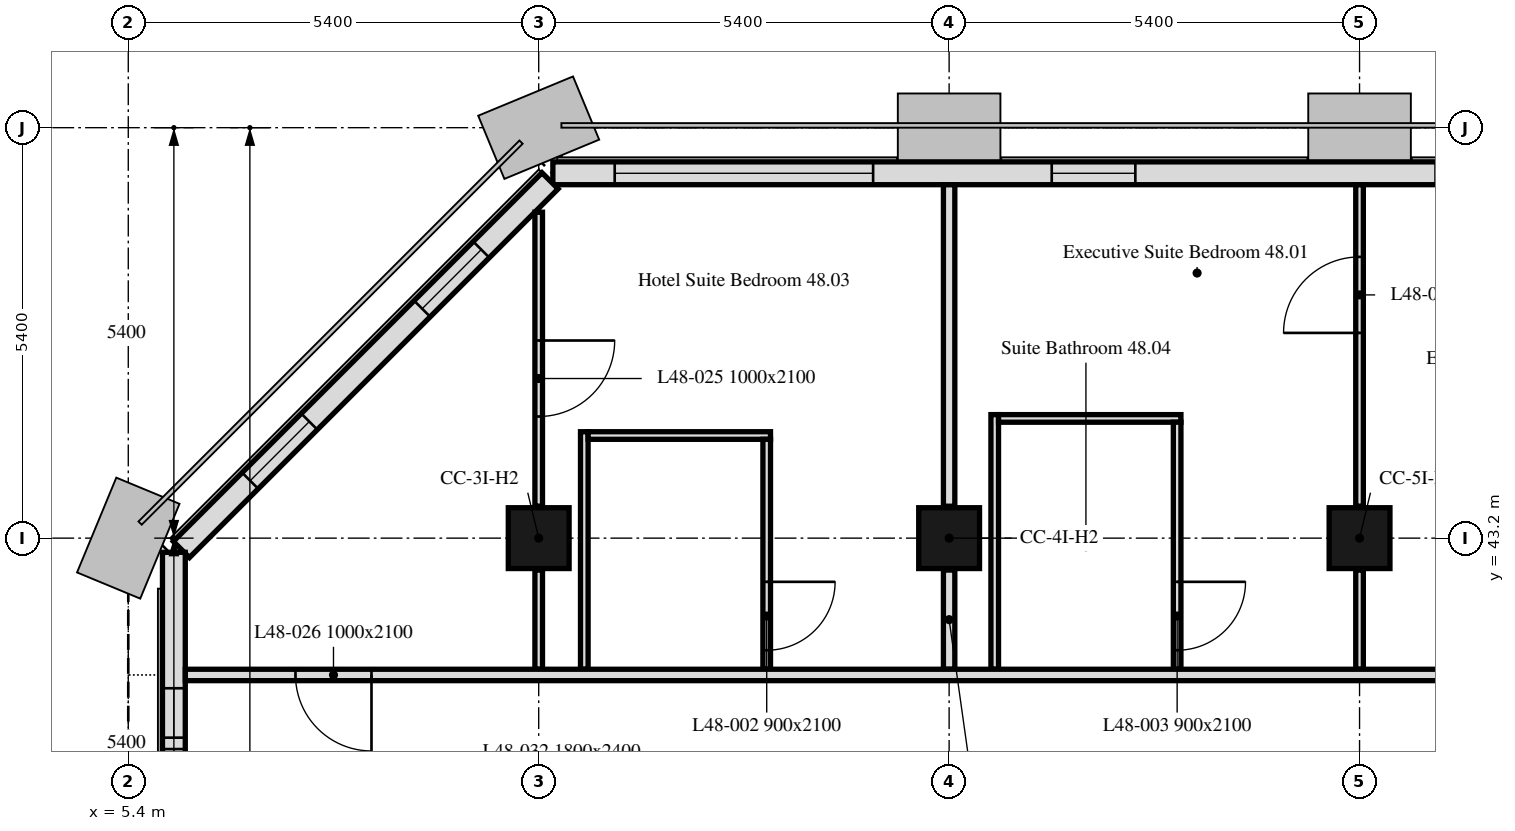
"""IFC4 building model, lengths in metres.
Left out: names, types, materials, properties, quantities, classifications, styles, units other than length and angle.
Written with IfcOpenShell. Run it as: python <this file> out.ifc"""

import sys

from ifc_helpers import new_model, si_unit, direction, frame, frame_2d, origin, origin_2d, place, context, subcontext, project, spatial, rectangle, extrude, element, fill, save


model = new_model("IFC4")
c1 = context("Model", 3, precision=1e-05, world=origin(), true_north=direction((0.0, 1.0)))
c2 = subcontext(c1, "Body", "Model", "MODEL_VIEW")
j1 = project(units=[si_unit("LENGTHUNIT", "METRE"), si_unit("PLANEANGLEUNIT", "RADIAN")], contexts=[c1])
p1 = place(None, origin())
s1 = spatial("IfcSite", under=j1, at=p1, CompositionType="ELEMENT")
p2 = place(p1, origin())
s2 = spatial("IfcBuilding", under=s1, at=p2, CompositionType="ELEMENT")
p3 = place(p2, frame((0.0, 0.0, 197.2)))
s3 = spatial("IfcBuildingStorey", under=s2, at=p3, CompositionType="ELEMENT", Elevation=197.2)
for number, where, z_axis, x_axis in (
    (1, (10.8, 43.2, 0.0), (0.0, 0.0, 1.0), (1.0, 0.0, 0.0)),
    (2, (16.2, 43.2, 0.0), (0.0, 0.0, 1.0), (1.0, 0.0, 0.0)),
    (3, (21.6, 43.2, 0.0), (0.0, 0.0, 1.0), (1.0, 0.0, 0.0)),
):
    element("IfcColumn", number, at=place(p3, frame(where, z_axis=z_axis, x_axis=x_axis)), inside=s3, PredefinedType="COLUMN", context=c2, shape_type="SweptSolid", body=[
        extrude(rectangle(XDim=0.8, YDim=0.8, at=origin_2d()), origin(), (0.0, 0.0, 1.0), 3.0),
    ])
p4 = place(p3, frame((43.014, 48.0, 0.0), z_axis=(0.0, 0.0, 1.0), x_axis=(-1.0, 0.0, 0.0)))
e4 = element("IfcWall", 4, at=p4, inside=s3, PredefinedType="SOLIDWALL", context=c2, shape_type="SweptSolid", body=[
    extrude(rectangle(XDim=32.027, YDim=0.3, at=frame_2d((16.014, 0.0))), origin(), (0.0, 0.0, 1.0), 3.0),
])
p5 = place(p4, frame((2.764, 0.0, 0.9)))
e5 = element("IfcOpeningElement", 5, at=p5, cuts=e4, PredefinedType="OPENING", context=c2, shape_type="SweptSolid", body=[
    extrude(rectangle(XDim=1.1, YDim=1.7, at=frame_2d((0.55, 0.85))), frame((0.0, 0.16, 0.0), z_axis=(0.0, -1.0, 0.0), x_axis=(1.0, 0.0, 0.0)), (0.0, 0.0, 1.0), 0.32),
])
p6 = place(p4, frame((6.214, 0.0, 0.9)))
e6 = element("IfcOpeningElement", 6, at=p6, cuts=e4, PredefinedType="OPENING", context=c2, shape_type="SweptSolid", body=[
    extrude(rectangle(XDim=3.4, YDim=1.7, at=frame_2d((1.7, 0.85))), frame((0.0, 0.16, 0.0), z_axis=(0.0, -1.0, 0.0), x_axis=(1.0, 0.0, 0.0)), (0.0, 0.0, 1.0), 0.32),
])
p7 = place(p4, frame((13.564, 0.0, 0.9)))
e7 = element("IfcOpeningElement", 7, at=p7, cuts=e4, PredefinedType="OPENING", context=c2, shape_type="SweptSolid", body=[
    extrude(rectangle(XDim=1.1, YDim=1.7, at=frame_2d((0.55, 0.85))), frame((0.0, 0.16, 0.0), z_axis=(0.0, -1.0, 0.0), x_axis=(1.0, 0.0, 0.0)), (0.0, 0.0, 1.0), 0.32),
])
p8 = place(p4, frame((17.014, 0.0, 0.9)))
e8 = element("IfcOpeningElement", 8, at=p8, cuts=e4, PredefinedType="OPENING", context=c2, shape_type="SweptSolid", body=[
    extrude(rectangle(XDim=3.4, YDim=1.7, at=frame_2d((1.7, 0.85))), frame((0.0, 0.16, 0.0), z_axis=(0.0, -1.0, 0.0), x_axis=(1.0, 0.0, 0.0)), (0.0, 0.0, 1.0), 0.32),
])
p9 = place(p4, frame((24.364, 0.0, 0.9)))
e9 = element("IfcOpeningElement", 9, at=p9, cuts=e4, PredefinedType="OPENING", context=c2, shape_type="SweptSolid", body=[
    extrude(rectangle(XDim=1.1, YDim=1.7, at=frame_2d((0.55, 0.85))), frame((0.0, 0.16, 0.0), z_axis=(0.0, -1.0, 0.0), x_axis=(1.0, 0.0, 0.0)), (0.0, 0.0, 1.0), 0.32),
])
p10 = place(p4, frame((27.814, 0.0, 0.9)))
e10 = element("IfcOpeningElement", 10, at=p10, cuts=e4, PredefinedType="OPENING", context=c2, shape_type="SweptSolid", body=[
    extrude(rectangle(XDim=3.4, YDim=1.7, at=frame_2d((1.7, 0.85))), frame((0.0, 0.16, 0.0), z_axis=(0.0, -1.0, 0.0), x_axis=(1.0, 0.0, 0.0)), (0.0, 0.0, 1.0), 0.32),
])
p11 = place(p3, frame((10.949, 47.901, 0.0), z_axis=(0.0, 0.0, 1.0), x_axis=(-0.707106781187, -0.707106781187, 0.0)))
e11 = element("IfcWall", 11, at=p11, inside=s3, PredefinedType="SOLIDWALL", context=c2, shape_type="SweptSolid", body=[
    extrude(rectangle(XDim=6.86, YDim=0.3, at=frame_2d((3.43, 0.0))), origin(), (0.0, 0.0, 1.0), 3.0),
])
p12 = place(p11, frame((1.28, 0.0, 0.9)))
e12 = element("IfcOpeningElement", 12, at=p12, cuts=e11, PredefinedType="OPENING", context=c2, shape_type="SweptSolid", body=[
    extrude(rectangle(XDim=1.1, YDim=1.7, at=frame_2d((0.55, 0.85))), frame((0.0, 0.16, 0.0), z_axis=(0.0, -1.0, 0.0), x_axis=(1.0, 0.0, 0.0)), (0.0, 0.0, 1.0), 0.32),
])
p13 = place(p11, frame((4.48, 0.0, 0.9)))
e13 = element("IfcOpeningElement", 13, at=p13, cuts=e11, PredefinedType="OPENING", context=c2, shape_type="SweptSolid", body=[
    extrude(rectangle(XDim=1.1, YDim=1.7, at=frame_2d((0.55, 0.85))), frame((0.0, 0.16, 0.0), z_axis=(0.0, -1.0, 0.0), x_axis=(1.0, 0.0, 0.0)), (0.0, 0.0, 1.0), 0.32),
])
p14 = place(p3, frame((6.0, 43.014, 0.0), z_axis=(0.0, 0.0, 1.0), x_axis=(0.0, -1.0, 0.0)))
e14 = element("IfcWall", 14, at=p14, inside=s3, PredefinedType="SOLIDWALL", context=c2, shape_type="SweptSolid", body=[
    extrude(rectangle(XDim=10.614, YDim=0.3, at=frame_2d((5.307, 0.0))), origin(), (0.0, 0.0, 1.0), 3.0),
])
p15 = place(p14, frame((1.789, 0.0, 0.9)))
e15 = element("IfcOpeningElement", 15, at=p15, cuts=e14, PredefinedType="OPENING", context=c2, shape_type="SweptSolid", body=[
    extrude(rectangle(XDim=0.65, YDim=1.7, at=frame_2d((0.325, 0.85))), frame((0.0, 0.16, 0.0), z_axis=(0.0, -1.0, 0.0), x_axis=(1.0, 0.0, 0.0)), (0.0, 0.0, 1.0), 0.32),
])
p16 = place(p14, frame((2.589, 0.0, 0.9)))
e16 = element("IfcOpeningElement", 16, at=p16, cuts=e14, PredefinedType="OPENING", context=c2, shape_type="SweptSolid", body=[
    extrude(rectangle(XDim=0.65, YDim=1.7, at=frame_2d((0.325, 0.85))), frame((0.0, 0.16, 0.0), z_axis=(0.0, -1.0, 0.0), x_axis=(1.0, 0.0, 0.0)), (0.0, 0.0, 1.0), 0.32),
])
p17 = place(p14, frame((6.214, 0.0, 0.9)))
e17 = element("IfcOpeningElement", 17, at=p17, cuts=e14, PredefinedType="OPENING", context=c2, shape_type="SweptSolid", body=[
    extrude(rectangle(XDim=3.4, YDim=1.7, at=frame_2d((1.7, 0.85))), frame((0.0, 0.16, 0.0), z_axis=(0.0, -1.0, 0.0), x_axis=(1.0, 0.0, 0.0)), (0.0, 0.0, 1.0), 0.32),
])
p18 = place(p3, frame((10.8, 47.488, 0.0), z_axis=(0.0, 0.0, 1.0), x_axis=(0.0, -1.0, 0.0)))
e18 = element("IfcWall", 18, at=p18, inside=s3, PredefinedType="PARTITIONING", context=c2, shape_type="SweptSolid", body=[
    extrude(rectangle(XDim=3.868, YDim=0.1, at=frame_2d((1.934, 0.0))), origin(), (0.0, 0.0, 1.0), 3.0),
])
p19 = place(p18, frame((1.688, 0.0, 0.0)))
e19 = element("IfcOpeningElement", 19, at=p19, cuts=e18, PredefinedType="OPENING", context=c2, shape_type="SweptSolid", body=[
    extrude(rectangle(XDim=1.0, YDim=2.1, at=frame_2d((0.5, 1.05))), frame((0.0, 0.05, 0.0), z_axis=(0.0, -1.0, 0.0), x_axis=(1.0, 0.0, 0.0)), (0.0, 0.0, 1.0), 0.1),
])
p20 = place(p3, frame((10.8, 42.78, 0.0), z_axis=(0.0, 0.0, 1.0), x_axis=(0.0, -1.0, 0.0)))
e20 = element("IfcWall", 20, at=p20, inside=s3, PredefinedType="PARTITIONING", context=c2, shape_type="SweptSolid", body=[
    extrude(rectangle(XDim=1.305, YDim=0.1, at=frame_2d((0.652, 0.0))), origin(), (0.0, 0.0, 1.0), 3.0),
])
p21 = place(p3, frame((11.4, 41.475, 0.0), z_axis=(0.0, 0.0, 1.0), x_axis=(0.0, 1.0, 0.0)))
e21 = element("IfcWall", 21, at=p21, inside=s3, PredefinedType="PARTITIONING", context=c2, shape_type="SweptSolid", body=[
    extrude(rectangle(XDim=3.125, YDim=0.1, at=frame_2d((1.562, 0.0))), origin(), (0.0, 0.0, 1.0), 3.0),
])
p22 = place(p3, frame((11.45, 44.55, 0.0), z_axis=(0.0, 0.0, 1.0), x_axis=(1.0, 0.0, 0.0)))
e22 = element("IfcWall", 22, at=p22, inside=s3, PredefinedType="PARTITIONING", context=c2, shape_type="SweptSolid", body=[
    extrude(rectangle(XDim=2.4, YDim=0.1, at=frame_2d((1.2, 0.0))), origin(), (0.0, 0.0, 1.0), 3.0),
])
p23 = place(p3, frame((13.8, 44.5, 0.0), z_axis=(0.0, 0.0, 1.0), x_axis=(0.0, -1.0, 0.0)))
e23 = element("IfcWall", 23, at=p23, inside=s3, PredefinedType="PARTITIONING", context=c2, shape_type="SweptSolid", body=[
    extrude(rectangle(XDim=3.025, YDim=0.1, at=frame_2d((1.512, 0.0))), origin(), (0.0, 0.0, 1.0), 3.0),
])
p24 = place(p23, frame((1.875, 0.0, 0.0)))
e24 = element("IfcOpeningElement", 24, at=p24, cuts=e23, PredefinedType="OPENING", context=c2, shape_type="SweptSolid", body=[
    extrude(rectangle(XDim=0.9, YDim=2.1, at=frame_2d((0.45, 1.05))), frame((0.0, 0.05, 0.0), z_axis=(0.0, -1.0, 0.0), x_axis=(1.0, 0.0, 0.0)), (0.0, 0.0, 1.0), 0.1),
])
p25 = place(p3, frame((16.2, 41.475, 0.0), z_axis=(0.0, 0.0, 1.0), x_axis=(0.0, 1.0, 0.0)))
e25 = element("IfcWall", 25, at=p25, inside=s3, PredefinedType="PARTITIONING", context=c2, shape_type="SweptSolid", body=[
    extrude(rectangle(XDim=1.305, YDim=0.15, at=frame_2d((0.652, 0.0))), origin(), (0.0, 0.0, 1.0), 2.4),
])
p26 = place(p3, frame((16.2, 43.62, 0.0), z_axis=(0.0, 0.0, 1.0), x_axis=(0.0, 1.0, 0.0)))
e26 = element("IfcWall", 26, at=p26, inside=s3, PredefinedType="PARTITIONING", context=c2, shape_type="SweptSolid", body=[
    extrude(rectangle(XDim=4.229, YDim=0.15, at=frame_2d((2.115, 0.0))), origin(), (0.0, 0.0, 1.0), 2.4),
])
p27 = place(p3, frame((16.8, 41.475, 0.0), z_axis=(0.0, 0.0, 1.0), x_axis=(0.0, 1.0, 0.0)))
e27 = element("IfcWall", 27, at=p27, inside=s3, PredefinedType="PARTITIONING", context=c2, shape_type="SweptSolid", body=[
    extrude(rectangle(XDim=3.35, YDim=0.1, at=frame_2d((1.675, 0.0))), origin(), (0.0, 0.0, 1.0), 3.0),
])
p28 = place(p3, frame((16.85, 44.775, 0.0), z_axis=(0.0, 0.0, 1.0), x_axis=(1.0, 0.0, 0.0)))
e28 = element("IfcWall", 28, at=p28, inside=s3, PredefinedType="PARTITIONING", context=c2, shape_type="SweptSolid", body=[
    extrude(rectangle(XDim=2.4, YDim=0.1, at=frame_2d((1.2, 0.0))), origin(), (0.0, 0.0, 1.0), 3.0),
])
p29 = place(p3, frame((19.2, 44.725, 0.0), z_axis=(0.0, 0.0, 1.0), x_axis=(0.0, -1.0, 0.0)))
e29 = element("IfcWall", 29, at=p29, inside=s3, PredefinedType="PARTITIONING", context=c2, shape_type="SweptSolid", body=[
    extrude(rectangle(XDim=3.25, YDim=0.1, at=frame_2d((1.625, 0.0))), origin(), (0.0, 0.0, 1.0), 3.0),
])
p30 = place(p29, frame((2.1, 0.0, 0.0)))
e30 = element("IfcOpeningElement", 30, at=p30, cuts=e29, PredefinedType="OPENING", context=c2, shape_type="SweptSolid", body=[
    extrude(rectangle(XDim=0.9, YDim=2.1, at=frame_2d((0.45, 1.05))), frame((0.0, 0.05, 0.0), z_axis=(0.0, -1.0, 0.0), x_axis=(1.0, 0.0, 0.0)), (0.0, 0.0, 1.0), 0.1),
])
p31 = place(p3, frame((21.6, 41.475, 0.0), z_axis=(0.0, 0.0, 1.0), x_axis=(0.0, 1.0, 0.0)))
e31 = element("IfcWall", 31, at=p31, inside=s3, PredefinedType="PARTITIONING", context=c2, shape_type="SweptSolid", body=[
    extrude(rectangle(XDim=1.305, YDim=0.1, at=frame_2d((0.652, 0.0))), origin(), (0.0, 0.0, 1.0), 2.4),
])
p32 = place(p3, frame((21.6, 43.62, 0.0), z_axis=(0.0, 0.0, 1.0), x_axis=(0.0, 1.0, 0.0)))
e32 = element("IfcWall", 32, at=p32, inside=s3, PredefinedType="PARTITIONING", context=c2, shape_type="SweptSolid", body=[
    extrude(rectangle(XDim=4.229, YDim=0.1, at=frame_2d((2.115, 0.0))), origin(), (0.0, 0.0, 1.0), 2.4),
])
p33 = place(p32, frame((2.28, 0.0, 0.0)))
e33 = element("IfcOpeningElement", 33, at=p33, cuts=e32, PredefinedType="OPENING", context=c2, shape_type="SweptSolid", body=[
    extrude(rectangle(XDim=1.0, YDim=2.1, at=frame_2d((0.5, 1.05))), frame((0.0, 0.05, 0.0), z_axis=(0.0, -1.0, 0.0), x_axis=(1.0, 0.0, 0.0)), (0.0, 0.0, 1.0), 0.1),
])
p34 = place(p3, frame((47.849, 41.4, 0.0), z_axis=(0.0, 0.0, 1.0), x_axis=(-1.0, 0.0, 0.0)))
e34 = element("IfcWall", 34, at=p34, inside=s3, PredefinedType="PARTITIONING", context=c2, shape_type="SweptSolid", body=[
    extrude(rectangle(XDim=41.698, YDim=0.15, at=frame_2d((20.849, 0.0))), origin(), (0.0, 0.0, 1.0), 2.4),
])
p35 = place(p34, frame((39.249, 0.0, 0.0)))
e35 = element("IfcOpeningElement", 35, at=p35, cuts=e34, PredefinedType="OPENING", context=c2, shape_type="SweptSolid", body=[
    extrude(rectangle(XDim=1.0, YDim=2.1, at=frame_2d((0.5, 1.05))), frame((0.0, 0.075, 0.0), z_axis=(0.0, -1.0, 0.0), x_axis=(1.0, 0.0, 0.0)), (0.0, 0.0, 1.0), 0.15),
])
p36 = place(p34, frame((11.449, 0.0, 0.0)))
e36 = element("IfcOpeningElement", 36, at=p36, cuts=e34, PredefinedType="OPENING", context=c2, shape_type="SweptSolid", body=[
    extrude(rectangle(XDim=1.0, YDim=2.1, at=frame_2d((0.5, 1.05))), frame((0.0, 0.075, 0.0), z_axis=(0.0, -1.0, 0.0), x_axis=(1.0, 0.0, 0.0)), (0.0, 0.0, 1.0), 0.15),
])
p37 = place(p34, frame((3.099, 0.0, 0.0)))
e37 = element("IfcOpeningElement", 37, at=p37, cuts=e34, PredefinedType="OPENING", context=c2, shape_type="SweptSolid", body=[
    extrude(rectangle(XDim=1.0, YDim=2.1, at=frame_2d((0.5, 1.05))), frame((0.0, 0.075, 0.0), z_axis=(0.0, -1.0, 0.0), x_axis=(1.0, 0.0, 0.0)), (0.0, 0.0, 1.0), 0.15),
])
p38 = place(p34, frame((23.049, 0.0, 0.0)))
e38 = element("IfcOpeningElement", 38, at=p38, cuts=e34, PredefinedType="OPENING", context=c2, shape_type="SweptSolid", body=[
    extrude(rectangle(XDim=1.0, YDim=2.1, at=frame_2d((0.5, 1.05))), frame((0.0, 0.075, 0.0), z_axis=(0.0, -1.0, 0.0), x_axis=(1.0, 0.0, 0.0)), (0.0, 0.0, 1.0), 0.15),
])
p39 = place(p9, origin())
e39 = element("IfcWindow", 39, at=p39, inside=s3, PartitioningType="SINGLE_PANEL", PredefinedType="WINDOW", context=c2, shape_type="SweptSolid", body=[
    extrude(rectangle(XDim=1.1, YDim=1.7, at=frame_2d((0.55, 0.85))), frame((0.0, 0.03, 0.0), z_axis=(0.0, -1.0, 0.0), x_axis=(1.0, 0.0, 0.0)), (0.0, 0.0, 1.0), 0.06),
])
fill(e9, e39)
p40 = place(p10, origin())
e40 = element("IfcWindow", 40, at=p40, inside=s3, PartitioningType="SINGLE_PANEL", PredefinedType="WINDOW", context=c2, shape_type="SweptSolid", body=[
    extrude(rectangle(XDim=3.4, YDim=1.7, at=frame_2d((1.7, 0.85))), frame((0.0, 0.03, 0.0), z_axis=(0.0, -1.0, 0.0), x_axis=(1.0, 0.0, 0.0)), (0.0, 0.0, 1.0), 0.06),
])
fill(e10, e40)
p41 = place(p12, origin())
e41 = element("IfcWindow", 41, at=p41, inside=s3, PartitioningType="SINGLE_PANEL", PredefinedType="WINDOW", context=c2, shape_type="SweptSolid", body=[
    extrude(rectangle(XDim=1.1, YDim=1.7, at=frame_2d((0.55, 0.85))), frame((0.0, 0.03, 0.0), z_axis=(0.0, -1.0, 0.0), x_axis=(1.0, 0.0, 0.0)), (0.0, 0.0, 1.0), 0.06),
])
fill(e12, e41)
p42 = place(p13, origin())
e42 = element("IfcWindow", 42, at=p42, inside=s3, PartitioningType="SINGLE_PANEL", PredefinedType="WINDOW", context=c2, shape_type="SweptSolid", body=[
    extrude(rectangle(XDim=1.1, YDim=1.7, at=frame_2d((0.55, 0.85))), frame((0.0, 0.03, 0.0), z_axis=(0.0, -1.0, 0.0), x_axis=(1.0, 0.0, 0.0)), (0.0, 0.0, 1.0), 0.06),
])
fill(e13, e42)
p43 = place(p15, origin())
e43 = element("IfcWindow", 43, at=p43, inside=s3, PartitioningType="SINGLE_PANEL", PredefinedType="WINDOW", context=c2, shape_type="SweptSolid", body=[
    extrude(rectangle(XDim=0.65, YDim=1.7, at=frame_2d((0.325, 0.85))), frame((0.0, 0.03, 0.0), z_axis=(0.0, -1.0, 0.0), x_axis=(1.0, 0.0, 0.0)), (0.0, 0.0, 1.0), 0.06),
])
fill(e15, e43)
p44 = place(p16, origin())
e44 = element("IfcWindow", 44, at=p44, inside=s3, PartitioningType="SINGLE_PANEL", PredefinedType="WINDOW", context=c2, shape_type="SweptSolid", body=[
    extrude(rectangle(XDim=0.65, YDim=1.7, at=frame_2d((0.325, 0.85))), frame((0.0, 0.03, 0.0), z_axis=(0.0, -1.0, 0.0), x_axis=(1.0, 0.0, 0.0)), (0.0, 0.0, 1.0), 0.06),
])
fill(e16, e44)
p45 = place(p24, origin())
e45 = element("IfcDoor", 45, at=p45, inside=s3, OperationType="SINGLE_SWING_RIGHT", PredefinedType="DOOR", context=c2, shape_type="SweptSolid", body=[
    extrude(rectangle(XDim=0.9, YDim=2.1, at=frame_2d((0.45, 1.05))), frame((0.0, 0.025, 0.0), z_axis=(0.0, -1.0, 0.0), x_axis=(1.0, 0.0, 0.0)), (0.0, 0.0, 1.0), 0.05),
])
fill(e24, e45)
p46 = place(p30, origin())
e46 = element("IfcDoor", 46, at=p46, inside=s3, OperationType="SINGLE_SWING_RIGHT", PredefinedType="DOOR", context=c2, shape_type="SweptSolid", body=[
    extrude(rectangle(XDim=0.9, YDim=2.1, at=frame_2d((0.45, 1.05))), frame((0.0, 0.025, 0.0), z_axis=(0.0, -1.0, 0.0), x_axis=(1.0, 0.0, 0.0)), (0.0, 0.0, 1.0), 0.05),
])
fill(e30, e46)
p47 = place(p19, origin())
e47 = element("IfcDoor", 47, at=p47, inside=s3, OperationType="SINGLE_SWING_RIGHT", PredefinedType="DOOR", context=c2, shape_type="SweptSolid", body=[
    extrude(rectangle(XDim=1.0, YDim=2.1, at=frame_2d((0.5, 1.05))), frame((0.0, 0.025, 0.0), z_axis=(0.0, -1.0, 0.0), x_axis=(1.0, 0.0, 0.0)), (0.0, 0.0, 1.0), 0.05),
])
fill(e19, e47)
p48 = place(p35, origin())
e48 = element("IfcDoor", 48, at=p48, inside=s3, OperationType="SINGLE_SWING_LEFT", PredefinedType="DOOR", context=c2, shape_type="SweptSolid", body=[
    extrude(rectangle(XDim=1.0, YDim=2.1, at=frame_2d((0.5, 1.05))), frame((0.0, 0.025, 0.0), z_axis=(0.0, -1.0, 0.0), x_axis=(1.0, 0.0, 0.0)), (0.0, 0.0, 1.0), 0.05),
])
fill(e35, e48)
p49 = place(p33, origin())
e49 = element("IfcDoor", 49, at=p49, inside=s3, OperationType="SINGLE_SWING_RIGHT", PredefinedType="DOOR", context=c2, shape_type="SweptSolid", body=[
    extrude(rectangle(XDim=1.0, YDim=2.1, at=frame_2d((0.5, 1.05))), frame((0.0, 0.025, 0.0), z_axis=(0.0, -1.0, 0.0), x_axis=(1.0, 0.0, 0.0)), (0.0, 0.0, 1.0), 0.05),
])
fill(e33, e49)
save(model, sys.argv[1])
